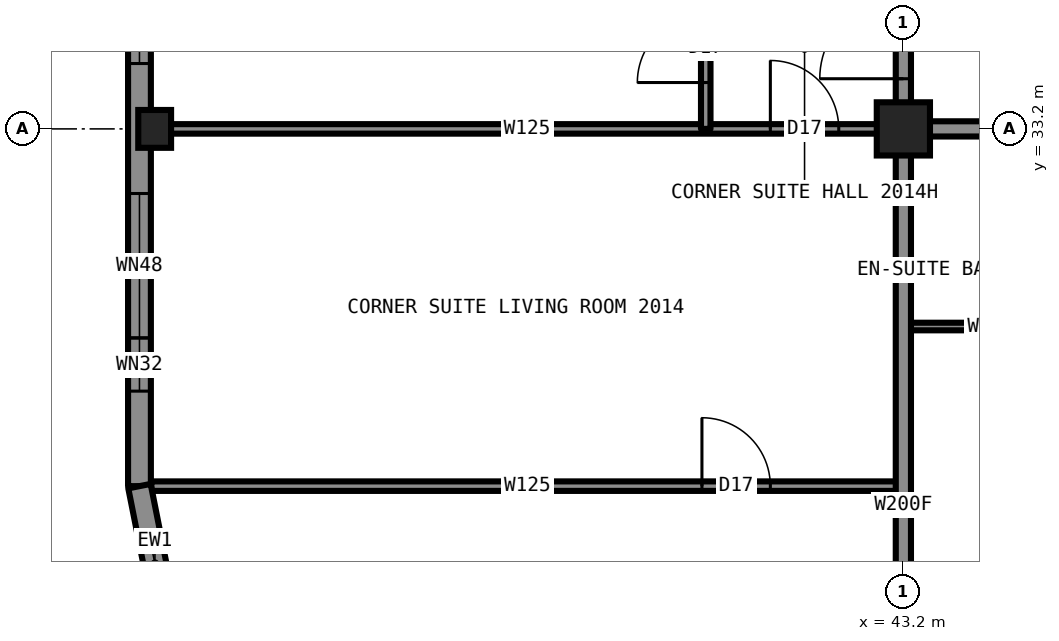
"""IFC4 building model, lengths in metres.
Left out: names, types, materials, properties, quantities, classifications, styles, units other than length and angle.
Written with IfcOpenShell. Run it as: python <this file> out.ifc"""

import sys

from ifc_helpers import new_model, si_unit, direction, frame, frame_2d, origin, origin_2d, place, context, subcontext, project, spatial, rectangle, hollow_rectangle, i_section, extrude, element, fill, save


model = new_model("IFC4")
c1 = context("Model", 3, precision=1e-05, world=origin(), true_north=direction((0.0, 1.0)))
c2 = subcontext(c1, "Body", "Model", "MODEL_VIEW")
j1 = project(units=[si_unit("LENGTHUNIT", "METRE"), si_unit("PLANEANGLEUNIT", "RADIAN")], contexts=[c1])
p1 = place(None, origin())
s1 = spatial("IfcSite", under=j1, at=p1, CompositionType="ELEMENT")
p2 = place(p1, origin())
s2 = spatial("IfcBuilding", under=s1, at=p2, CompositionType="ELEMENT")
p3 = place(p2, frame((0.0, 0.0, 70.5)))
s3 = spatial("IfcBuildingStorey", under=s2, at=p3, CompositionType="ELEMENT", Elevation=70.5)
p4 = place(p3, frame((33.35, 33.2, 0.0), z_axis=(0.0, 0.0, 1.0), x_axis=(1.0, 0.0, 0.0)))
e1 = element("IfcColumn", 1, at=p4, inside=s3, PredefinedType="COLUMN", context=c2, shape_type="SweptSolid", body=[
    extrude(i_section(OverallWidth=0.432, OverallDepth=0.498, WebThickness=0.056, FlangeThickness=0.089, at=origin_2d()), origin(), (0.0, 0.0, 1.0), 3.5),
])
p5 = place(p3, frame((43.2, 33.2, 0.0), z_axis=(0.0, 0.0, 1.0), x_axis=(1.0, 0.0, 0.0)))
e2 = element("IfcColumn", 2, at=p5, inside=s3, PredefinedType="COLUMN", context=c2, shape_type="SweptSolid", body=[
    extrude(hollow_rectangle(XDim=0.7, YDim=0.7, WallThickness=0.06, at=origin_2d()), origin(), (0.0, 0.0, 1.0), 3.5),
])
p6 = place(p3, frame((43.2, 33.2, 0.0), z_axis=(0.0, 0.0, 1.0), x_axis=(1.0, 0.0, 0.0)))
e3 = element("IfcWall", 3, at=p6, inside=s3, PredefinedType="PARTITIONING", context=c2, shape_type="SweptSolid", body=[
    extrude(rectangle(XDim=23.6, YDim=0.2, at=frame_2d((11.8, 0.0))), origin(), (0.0, 0.0, 1.0), 3.33),
])
p7 = place(p6, frame((2.55, 0.0, 0.0)))
e4 = element("IfcOpeningElement", 4, at=p7, cuts=e3, PredefinedType="OPENING", context=c2, shape_type="SweptSolid", body=[
    extrude(rectangle(XDim=1.0, YDim=2.2, at=frame_2d((0.5, 1.1))), frame((0.0, 0.11, 0.0), z_axis=(0.0, -1.0, 0.0), x_axis=(1.0, 0.0, 0.0)), (0.0, 0.0, 1.0), 0.22),
])
p8 = place(p6, frame((5.12, 0.0, 0.0)))
e5 = element("IfcOpeningElement", 5, at=p8, cuts=e3, PredefinedType="OPENING", context=c2, shape_type="SweptSolid", body=[
    extrude(rectangle(XDim=1.0, YDim=2.2, at=frame_2d((0.5, 1.1))), frame((0.0, 0.11, 0.0), z_axis=(0.0, -1.0, 0.0), x_axis=(1.0, 0.0, 0.0)), (0.0, 0.0, 1.0), 0.22),
])
p9 = place(p6, frame((11.7, 0.0, 0.0)))
e6 = element("IfcOpeningElement", 6, at=p9, cuts=e3, PredefinedType="OPENING", context=c2, shape_type="SweptSolid", body=[
    extrude(rectangle(XDim=1.0, YDim=2.2, at=frame_2d((0.5, 1.1))), frame((0.0, 0.11, 0.0), z_axis=(0.0, -1.0, 0.0), x_axis=(1.0, 0.0, 0.0)), (0.0, 0.0, 1.0), 0.22),
])
p10 = place(p6, frame((16.42, 0.0, 0.0)))
e7 = element("IfcOpeningElement", 7, at=p10, cuts=e3, PredefinedType="OPENING", context=c2, shape_type="SweptSolid", body=[
    extrude(rectangle(XDim=1.0, YDim=2.2, at=frame_2d((0.5, 1.1))), frame((0.0, 0.11, 0.0), z_axis=(0.0, -1.0, 0.0), x_axis=(1.0, 0.0, 0.0)), (0.0, 0.0, 1.0), 0.22),
])
p11 = place(p6, frame((21.43, 0.0, 0.0)))
e8 = element("IfcOpeningElement", 8, at=p11, cuts=e3, PredefinedType="OPENING", context=c2, shape_type="SweptSolid", body=[
    extrude(rectangle(XDim=1.0, YDim=2.2, at=frame_2d((0.5, 1.1))), frame((0.0, 0.11, 0.0), z_axis=(0.0, -1.0, 0.0), x_axis=(1.0, 0.0, 0.0)), (0.0, 0.0, 1.0), 0.22),
])
p12 = place(p3, frame((33.3, 33.2, 0.0), z_axis=(0.0, 0.0, 1.0), x_axis=(1.0, 0.0, 0.0)))
e9 = element("IfcWall", 9, at=p12, inside=s3, PredefinedType="PARTITIONING", context=c2, shape_type="SweptSolid", body=[
    extrude(rectangle(XDim=9.9, YDim=0.125, at=frame_2d((4.95, 0.0))), origin(), (0.0, 0.0, 1.0), 2.573),
])
p13 = place(p12, frame((8.15, 0.0, 0.0)))
e10 = element("IfcOpeningElement", 10, at=p13, cuts=e9, PredefinedType="OPENING", context=c2, shape_type="SweptSolid", body=[
    extrude(rectangle(XDim=0.9, YDim=2.2, at=frame_2d((0.45, 1.1))), frame((0.0, 0.073, 0.0), z_axis=(0.0, -1.0, 0.0), x_axis=(1.0, 0.0, 0.0)), (0.0, 0.0, 1.0), 0.145),
])
p14 = place(p3, frame((43.2, 30.6, 0.0), z_axis=(0.0, 0.0, 1.0), x_axis=(1.0, 0.0, 0.0)))
e11 = element("IfcWall", 11, at=p14, inside=s3, PredefinedType="PARTITIONING", context=c2, shape_type="SweptSolid", body=[
    extrude(rectangle(XDim=2.3, YDim=0.1, at=frame_2d((1.15, 0.0))), origin(), (0.0, 0.0, 1.0), 3.33),
])
p15 = place(p3, frame((33.306, 28.5, 0.0), z_axis=(0.0, 0.0, 1.0), x_axis=(1.0, 0.0, 0.0)))
e12 = element("IfcWall", 12, at=p15, inside=s3, PredefinedType="PARTITIONING", context=c2, shape_type="SweptSolid", body=[
    extrude(rectangle(XDim=9.894, YDim=0.125, at=frame_2d((4.947, 0.0))), origin(), (0.0, 0.0, 1.0), 3.33),
])
p16 = place(p15, frame((7.244, 0.0, 0.0)))
e13 = element("IfcOpeningElement", 13, at=p16, cuts=e12, PredefinedType="OPENING", context=c2, shape_type="SweptSolid", body=[
    extrude(rectangle(XDim=0.9, YDim=2.2, at=frame_2d((0.45, 1.1))), frame((0.0, 0.073, 0.0), z_axis=(0.0, -1.0, 0.0), x_axis=(1.0, 0.0, 0.0)), (0.0, 0.0, 1.0), 0.145),
])
p17 = place(p3, frame((43.2, 33.2, 0.0), z_axis=(0.0, 0.0, 1.0), x_axis=(0.0, 1.0, 0.0)))
e14 = element("IfcWall", 14, at=p17, inside=s3, PredefinedType="PARTITIONING", context=c2, shape_type="SweptSolid", body=[
    extrude(rectangle(XDim=23.6, YDim=0.2, at=frame_2d((11.8, 0.0))), origin(), (0.0, 0.0, 1.0), 3.33),
])
p18 = place(p17, frame((7.87, 0.0, 0.0)))
e15 = element("IfcOpeningElement", 15, at=p18, cuts=e14, PredefinedType="OPENING", context=c2, shape_type="SweptSolid", body=[
    extrude(rectangle(XDim=1.0, YDim=2.2, at=frame_2d((0.5, 1.1))), frame((0.0, 0.11, 0.0), z_axis=(0.0, -1.0, 0.0), x_axis=(1.0, 0.0, 0.0)), (0.0, 0.0, 1.0), 0.22),
])
p19 = place(p17, frame((12.44, 0.0, 0.0)))
e16 = element("IfcOpeningElement", 16, at=p19, cuts=e14, PredefinedType="OPENING", context=c2, shape_type="SweptSolid", body=[
    extrude(rectangle(XDim=1.0, YDim=2.2, at=frame_2d((0.5, 1.1))), frame((0.0, 0.11, 0.0), z_axis=(0.0, -1.0, 0.0), x_axis=(1.0, 0.0, 0.0)), (0.0, 0.0, 1.0), 0.22),
])
p20 = place(p17, frame((21.85, 0.0, 0.0)))
e17 = element("IfcOpeningElement", 17, at=p20, cuts=e14, PredefinedType="OPENING", context=c2, shape_type="SweptSolid", body=[
    extrude(rectangle(XDim=1.1, YDim=2.2, at=frame_2d((0.55, 1.1))), frame((0.0, 0.11, 0.0), z_axis=(0.0, -1.0, 0.0), x_axis=(1.0, 0.0, 0.0)), (0.0, 0.0, 1.0), 0.22),
])
p21 = place(p17, frame((0.66, 0.0, 0.0)))
e18 = element("IfcOpeningElement", 18, at=p21, cuts=e14, PredefinedType="OPENING", context=c2, shape_type="SweptSolid", body=[
    extrude(rectangle(XDim=1.1, YDim=2.2, at=frame_2d((0.55, 1.1))), frame((0.0, 0.11, 0.0), z_axis=(0.0, -1.0, 0.0), x_axis=(1.0, 0.0, 0.0)), (0.0, 0.0, 1.0), 0.22),
])
p22 = place(p3, frame((43.2, 23.3, 0.0), z_axis=(0.0, 0.0, 1.0), x_axis=(0.0, 1.0, 0.0)))
e19 = element("IfcWall", 19, at=p22, inside=s3, PredefinedType="PARTITIONING", context=c2, shape_type="SweptSolid", body=[
    extrude(rectangle(XDim=9.9, YDim=0.2, at=frame_2d((4.95, 0.0))), origin(), (0.0, 0.0, 1.0), 2.573),
])
p23 = place(p3, frame((40.6, 33.2, 0.0), z_axis=(0.0, 0.0, 1.0), x_axis=(0.0, 1.0, 0.0)))
e20 = element("IfcWall", 20, at=p23, inside=s3, PredefinedType="PARTITIONING", context=c2, shape_type="SweptSolid", body=[
    extrude(rectangle(XDim=2.12, YDim=0.125, at=frame_2d((1.06, 0.0))), origin(), (0.0, 0.0, 1.0), 3.33),
])
p24 = place(p23, frame((0.61, 0.0, 0.0)))
e21 = element("IfcOpeningElement", 21, at=p24, cuts=e20, PredefinedType="OPENING", context=c2, shape_type="SweptSolid", body=[
    extrude(rectangle(XDim=0.9, YDim=2.2, at=frame_2d((0.45, 1.1))), frame((0.0, 0.073, 0.0), z_axis=(0.0, -1.0, 0.0), x_axis=(1.0, 0.0, 0.0)), (0.0, 0.0, 1.0), 0.145),
])
p25 = place(p3, frame((33.15, 61.5, 0.0), z_axis=(0.0, 0.0, 1.0), x_axis=(0.0, -1.0, 0.0)))
e22 = element("IfcWall", 22, at=p25, inside=s3, PredefinedType="SOLIDWALL", context=c2, shape_type="SweptSolid", body=[
    extrude(rectangle(XDim=33.0, YDim=0.3, at=frame_2d((16.5, 0.0))), origin(), (0.0, 0.0, 1.0), 2.83),
])
p26 = place(p25, frame((0.85, 0.0, 0.5)))
e23 = element("IfcOpeningElement", 23, at=p26, cuts=e22, PredefinedType="OPENING", context=c2, shape_type="SweptSolid", body=[
    extrude(rectangle(XDim=2.9, YDim=2.0, at=frame_2d((1.45, 1.0))), frame((0.0, 0.16, 0.0), z_axis=(0.0, -1.0, 0.0), x_axis=(1.0, 0.0, 0.0)), (0.0, 0.0, 1.0), 0.32),
])
p27 = place(p25, frame((6.96, 0.0, 0.55)))
e24 = element("IfcOpeningElement", 24, at=p27, cuts=e22, PredefinedType="OPENING", context=c2, shape_type="SweptSolid", body=[
    extrude(rectangle(XDim=1.6, YDim=1.9, at=frame_2d((0.8, 0.95))), frame((0.0, 0.16, 0.0), z_axis=(0.0, -1.0, 0.0), x_axis=(1.0, 0.0, 0.0)), (0.0, 0.0, 1.0), 0.32),
])
p28 = place(p25, frame((10.28, 0.0, 0.5)))
e25 = element("IfcOpeningElement", 25, at=p28, cuts=e22, PredefinedType="OPENING", context=c2, shape_type="SweptSolid", body=[
    extrude(rectangle(XDim=3.0, YDim=2.0, at=frame_2d((1.5, 1.0))), frame((0.0, 0.16, 0.0), z_axis=(0.0, -1.0, 0.0), x_axis=(1.0, 0.0, 0.0)), (0.0, 0.0, 1.0), 0.32),
])
p29 = place(p25, frame((15.0, 0.0, 0.5)))
e26 = element("IfcOpeningElement", 26, at=p29, cuts=e22, PredefinedType="OPENING", context=c2, shape_type="SweptSolid", body=[
    extrude(rectangle(XDim=3.0, YDim=2.0, at=frame_2d((1.5, 1.0))), frame((0.0, 0.16, 0.0), z_axis=(0.0, -1.0, 0.0), x_axis=(1.0, 0.0, 0.0)), (0.0, 0.0, 1.0), 0.32),
])
p30 = place(p25, frame((19.72, 0.0, 0.5)))
e27 = element("IfcOpeningElement", 27, at=p30, cuts=e22, PredefinedType="OPENING", context=c2, shape_type="SweptSolid", body=[
    extrude(rectangle(XDim=3.0, YDim=2.0, at=frame_2d((1.5, 1.0))), frame((0.0, 0.16, 0.0), z_axis=(0.0, -1.0, 0.0), x_axis=(1.0, 0.0, 0.0)), (0.0, 0.0, 1.0), 0.32),
])
p31 = place(p25, frame((24.44, 0.0, 0.55)))
e28 = element("IfcOpeningElement", 28, at=p31, cuts=e22, PredefinedType="OPENING", context=c2, shape_type="SweptSolid", body=[
    extrude(rectangle(XDim=1.6, YDim=1.9, at=frame_2d((0.8, 0.95))), frame((0.0, 0.16, 0.0), z_axis=(0.0, -1.0, 0.0), x_axis=(1.0, 0.0, 0.0)), (0.0, 0.0, 1.0), 0.32),
])
p32 = place(p25, frame((29.25, 0.0, 0.5)))
e29 = element("IfcOpeningElement", 29, at=p32, cuts=e22, PredefinedType="OPENING", context=c2, shape_type="SweptSolid", body=[
    extrude(rectangle(XDim=2.9, YDim=2.0, at=frame_2d((1.45, 1.0))), frame((0.0, 0.16, 0.0), z_axis=(0.0, -1.0, 0.0), x_axis=(1.0, 0.0, 0.0)), (0.0, 0.0, 1.0), 0.32),
])
p33 = place(p25, frame((6.31, 0.0, 1.45)))
e30 = element("IfcOpeningElement", 30, at=p33, cuts=e22, PredefinedType="OPENING", context=c2, shape_type="SweptSolid", body=[
    extrude(rectangle(XDim=0.6, YDim=1.0, at=frame_2d((0.3, 0.5))), frame((0.0, 0.16, 0.0), z_axis=(0.0, -1.0, 0.0), x_axis=(1.0, 0.0, 0.0)), (0.0, 0.0, 1.0), 0.32),
])
p34 = place(p25, frame((26.04, 0.0, 1.45)))
e31 = element("IfcOpeningElement", 31, at=p34, cuts=e22, PredefinedType="OPENING", context=c2, shape_type="SweptSolid", body=[
    extrude(rectangle(XDim=0.6, YDim=1.0, at=frame_2d((0.3, 0.5))), frame((0.0, 0.16, 0.0), z_axis=(0.0, -1.0, 0.0), x_axis=(1.0, 0.0, 0.0)), (0.0, 0.0, 1.0), 0.32),
])
p35 = place(p3, frame((33.15, 28.5, 0.0), z_axis=(0.0, 0.0, 1.0), x_axis=(0.195081421501, -0.980787050784, 0.0)))
e32 = element("IfcWall", 32, at=p35, inside=s3, PredefinedType="SOLIDWALL", context=c2, shape_type="SweptSolid", body=[
    extrude(rectangle(XDim=2.087, YDim=0.3, at=frame_2d((1.044, 0.0))), origin(), (0.0, 0.0, 1.0), 3.33),
])
p36 = place(p35, frame((0.444, 0.0, 0.5)))
e33 = element("IfcOpeningElement", 33, at=p36, cuts=e32, PredefinedType="OPENING", context=c2, shape_type="SweptSolid", body=[
    extrude(rectangle(XDim=1.2, YDim=2.0, at=frame_2d((0.6, 1.0))), frame((0.0, 0.16, 0.0), z_axis=(0.0, -1.0, 0.0), x_axis=(1.0, 0.0, 0.0)), (0.0, 0.0, 1.0), 0.32),
])
p37 = place(p13, origin())
e34 = element("IfcDoor", 34, at=p37, inside=s3, OperationType="SINGLE_SWING_LEFT", PredefinedType="DOOR", context=c2, shape_type="SweptSolid", body=[
    extrude(rectangle(XDim=0.9, YDim=2.2, at=frame_2d((0.45, 1.1))), frame((0.0, 0.025, 0.0), z_axis=(0.0, -1.0, 0.0), x_axis=(1.0, 0.0, 0.0)), (0.0, 0.0, 1.0), 0.05),
])
fill(e10, e34)
p38 = place(p21, origin())
e35 = element("IfcDoor", 35, at=p38, inside=s3, OperationType="SINGLE_SWING_LEFT", PredefinedType="DOOR", context=c2, shape_type="SweptSolid", body=[
    extrude(rectangle(XDim=1.1, YDim=2.2, at=frame_2d((0.55, 1.1))), frame((0.0, 0.025, 0.0), z_axis=(0.0, -1.0, 0.0), x_axis=(1.0, 0.0, 0.0)), (0.0, 0.0, 1.0), 0.05),
])
fill(e18, e35)
p39 = place(p16, origin())
e36 = element("IfcDoor", 36, at=p39, inside=s3, OperationType="SINGLE_SWING_LEFT", PredefinedType="DOOR", context=c2, shape_type="SweptSolid", body=[
    extrude(rectangle(XDim=0.9, YDim=2.2, at=frame_2d((0.45, 1.1))), frame((0.0, 0.025, 0.0), z_axis=(0.0, -1.0, 0.0), x_axis=(1.0, 0.0, 0.0)), (0.0, 0.0, 1.0), 0.05),
])
fill(e13, e36)
p40 = place(p24, origin())
e37 = element("IfcDoor", 37, at=p40, inside=s3, OperationType="SINGLE_SWING_LEFT", PredefinedType="DOOR", context=c2, shape_type="SweptSolid", body=[
    extrude(rectangle(XDim=0.9, YDim=2.2, at=frame_2d((0.45, 1.1))), frame((0.0, 0.025, 0.0), z_axis=(0.0, -1.0, 0.0), x_axis=(1.0, 0.0, 0.0)), (0.0, 0.0, 1.0), 0.05),
])
fill(e21, e37)
p41 = place(p32, origin())
e38 = element("IfcWindow", 38, at=p41, inside=s3, PartitioningType="SINGLE_PANEL", PredefinedType="WINDOW", context=c2, shape_type="SweptSolid", body=[
    extrude(rectangle(XDim=2.9, YDim=2.0, at=frame_2d((1.45, 1.0))), frame((0.0, 0.03, 0.0), z_axis=(0.0, -1.0, 0.0), x_axis=(1.0, 0.0, 0.0)), (0.0, 0.0, 1.0), 0.06),
])
fill(e29, e38)
p42 = place(p36, origin())
e39 = element("IfcWindow", 39, at=p42, inside=s3, PartitioningType="SINGLE_PANEL", PredefinedType="WINDOW", context=c2, shape_type="SweptSolid", body=[
    extrude(rectangle(XDim=1.2, YDim=2.0, at=frame_2d((0.6, 1.0))), frame((0.0, 0.03, 0.0), z_axis=(0.0, -1.0, 0.0), x_axis=(1.0, 0.0, 0.0)), (0.0, 0.0, 1.0), 0.06),
])
fill(e33, e39)
save(model, sys.argv[1])
